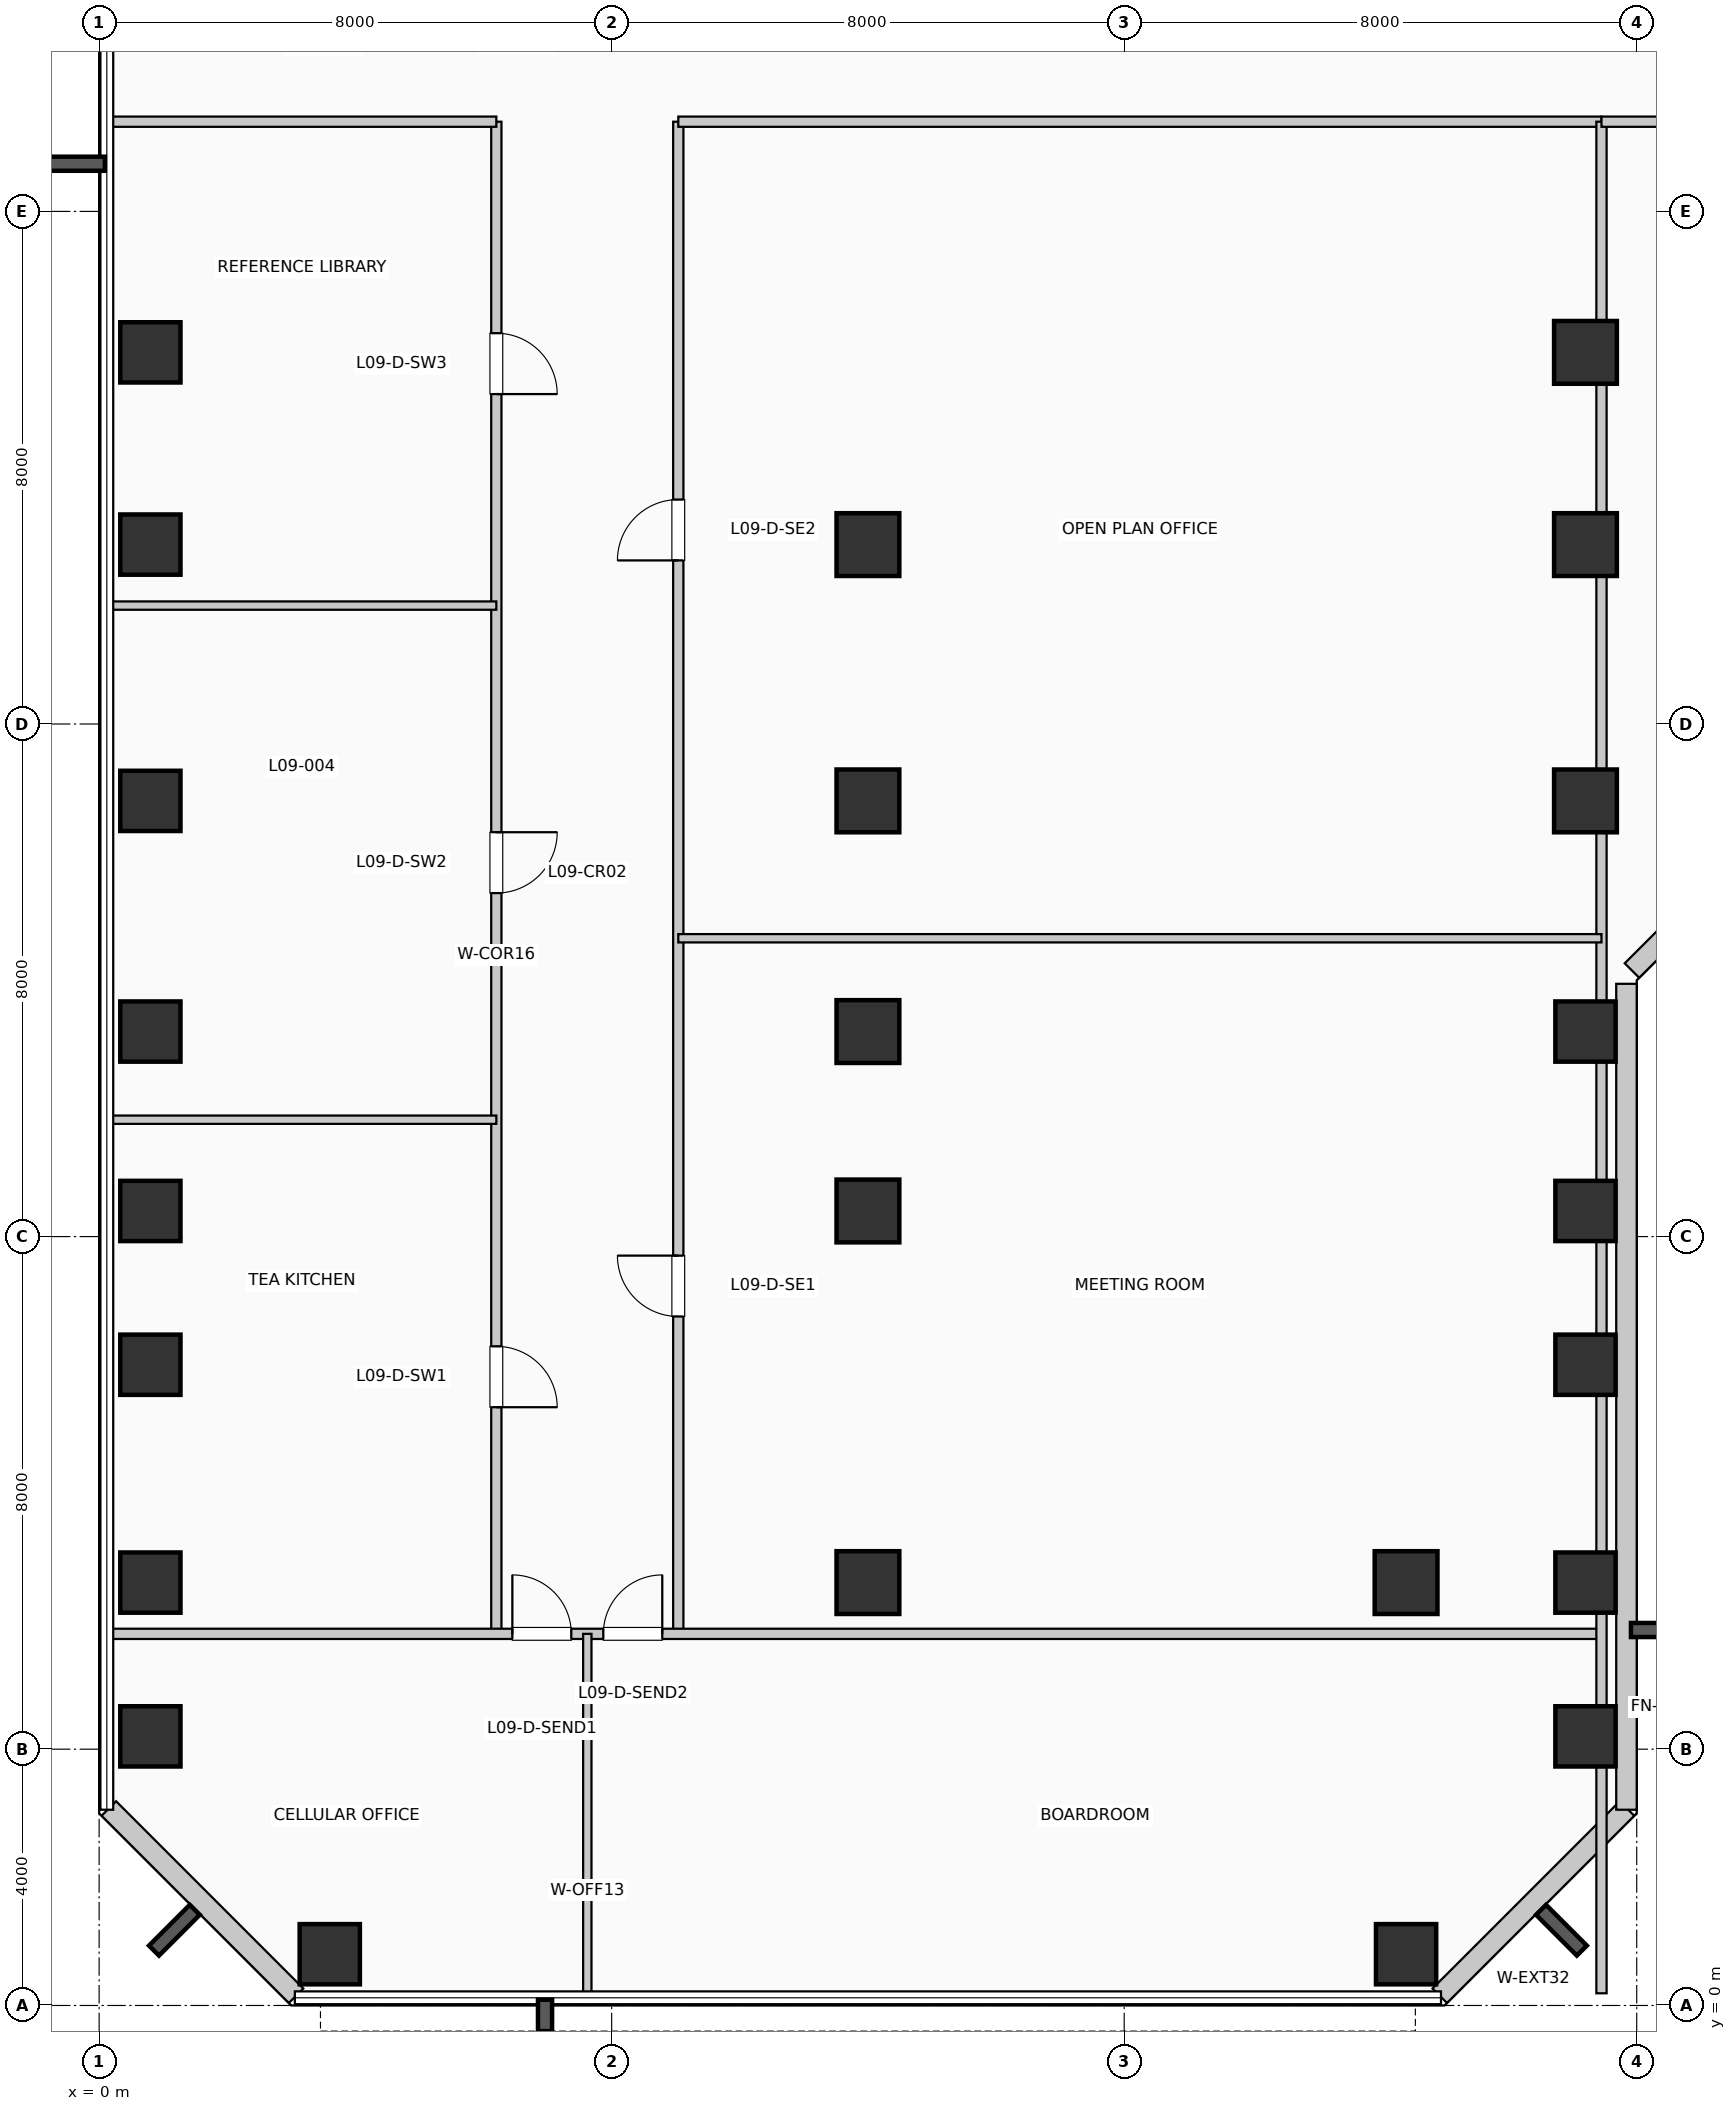
"""IFC4 building model, lengths in metres.
Left out: names, types, materials, properties, quantities, classifications, styles, units other than length and angle.
Written with IfcOpenShell. Run it as: python <this file> out.ifc"""

import sys

from ifc_helpers import new_model, si_unit, direction, frame, frame_2d, origin, origin_2d, place, context, subcontext, project, spatial, rectangle, extrude, element, fill, save


model = new_model("IFC4")
c1 = context("Model", 3, precision=1e-05, world=origin(), true_north=direction((0.0, 1.0)))
c2 = subcontext(c1, "Body", "Model", "MODEL_VIEW")
j1 = project(units=[si_unit("LENGTHUNIT", "METRE"), si_unit("PLANEANGLEUNIT", "RADIAN")], contexts=[c1])
p1 = place(None, origin())
s1 = spatial("IfcSite", under=j1, at=p1, CompositionType="ELEMENT")
p2 = place(p1, origin())
s2 = spatial("IfcBuilding", under=s1, at=p2, CompositionType="ELEMENT")
p3 = place(p2, frame((0.0, 0.0, 42.24)))
s3 = spatial("IfcBuildingStorey", under=s2, at=p3, CompositionType="ELEMENT", Elevation=42.24)
for number, where, z_axis, x_axis in (
    (1, (0.8, 4.2, 0.0), (0.0, 0.0, 1.0), (1.0, 0.0, 0.0)),
    (2, (0.8, 6.6, 0.0), (0.0, 0.0, 1.0), (1.0, 0.0, 0.0)),
    (3, (0.8, 10.0, 0.0), (0.0, 0.0, 1.0), (1.0, 0.0, 0.0)),
    (4, (0.8, 12.4, 0.0), (0.0, 0.0, 1.0), (1.0, 0.0, 0.0)),
    (5, (0.8, 15.2, 0.0), (0.0, 0.0, 1.0), (1.0, 0.0, 0.0)),
    (6, (0.8, 18.8, 0.0), (0.0, 0.0, 1.0), (1.0, 0.0, 0.0)),
    (7, (0.8, 22.8, 0.0), (0.0, 0.0, 1.0), (1.0, 0.0, 0.0)),
    (8, (0.8, 25.8, 0.0), (0.0, 0.0, 1.0), (1.0, 0.0, 0.0)),
    (9, (3.6, 0.8, 0.0), (0.0, 0.0, 1.0), (1.0, 0.0, 0.0)),
):
    element("IfcColumn", number, at=place(p3, frame(where, z_axis=z_axis, x_axis=x_axis)), inside=s3, PredefinedType="COLUMN", context=c2, shape_type="SweptSolid", body=[
        extrude(rectangle(XDim=0.94, YDim=0.94, at=origin_2d()), origin(), (0.0, 0.0, 1.0), 3.96),
    ])
for number, where, z_axis, x_axis in (
    (10, (12.0, 6.6, 0.0), (0.0, 0.0, 1.0), (1.0, 0.0, 0.0)),
    (11, (12.0, 12.4, 0.0), (0.0, 0.0, 1.0), (1.0, 0.0, 0.0)),
    (12, (12.0, 15.2, 0.0), (0.0, 0.0, 1.0), (1.0, 0.0, 0.0)),
    (13, (12.0, 18.8, 0.0), (0.0, 0.0, 1.0), (1.0, 0.0, 0.0)),
    (14, (12.0, 22.8, 0.0), (0.0, 0.0, 1.0), (1.0, 0.0, 0.0)),
):
    element("IfcColumn", number, at=place(p3, frame(where, z_axis=z_axis, x_axis=x_axis)), inside=s3, PredefinedType="COLUMN", context=c2, shape_type="SweptSolid", body=[
        extrude(rectangle(XDim=0.98, YDim=0.98, at=origin_2d()), origin(), (0.0, 0.0, 1.0), 3.96),
    ])
p4 = place(p3, frame((20.4, 0.8, 0.0), z_axis=(0.0, 0.0, 1.0), x_axis=(1.0, 0.0, 0.0)))
e15 = element("IfcColumn", 15, at=p4, inside=s3, PredefinedType="COLUMN", context=c2, shape_type="SweptSolid", body=[
    extrude(rectangle(XDim=0.94, YDim=0.94, at=origin_2d()), origin(), (0.0, 0.0, 1.0), 3.96),
])
p5 = place(p3, frame((20.4, 6.6, 0.0), z_axis=(0.0, 0.0, 1.0), x_axis=(1.0, 0.0, 0.0)))
e16 = element("IfcColumn", 16, at=p5, inside=s3, PredefinedType="COLUMN", context=c2, shape_type="SweptSolid", body=[
    extrude(rectangle(XDim=0.98, YDim=0.98, at=origin_2d()), origin(), (0.0, 0.0, 1.0), 3.96),
])
for number, where, z_axis, x_axis in (
    (17, (23.2, 4.2, 0.0), (0.0, 0.0, 1.0), (1.0, 0.0, 0.0)),
    (18, (23.2, 6.6, 0.0), (0.0, 0.0, 1.0), (1.0, 0.0, 0.0)),
    (19, (23.2, 10.0, 0.0), (0.0, 0.0, 1.0), (1.0, 0.0, 0.0)),
    (20, (23.2, 12.4, 0.0), (0.0, 0.0, 1.0), (1.0, 0.0, 0.0)),
    (21, (23.2, 15.2, 0.0), (0.0, 0.0, 1.0), (1.0, 0.0, 0.0)),
):
    element("IfcColumn", number, at=place(p3, frame(where, z_axis=z_axis, x_axis=x_axis)), inside=s3, PredefinedType="COLUMN", context=c2, shape_type="SweptSolid", body=[
        extrude(rectangle(XDim=0.94, YDim=0.94, at=origin_2d()), origin(), (0.0, 0.0, 1.0), 3.96),
    ])
for number, where, z_axis, x_axis in (
    (22, (23.2, 18.8, 0.0), (0.0, 0.0, 1.0), (1.0, 0.0, 0.0)),
    (23, (23.2, 22.8, 0.0), (0.0, 0.0, 1.0), (1.0, 0.0, 0.0)),
    (24, (23.2, 25.8, 0.0), (0.0, 0.0, 1.0), (1.0, 0.0, 0.0)),
):
    element("IfcColumn", number, at=place(p3, frame(where, z_axis=z_axis, x_axis=x_axis)), inside=s3, PredefinedType="COLUMN", context=c2, shape_type="SweptSolid", body=[
        extrude(rectangle(XDim=0.98, YDim=0.98, at=origin_2d()), origin(), (0.0, 0.0, 1.0), 3.96),
    ])
p6 = place(p3, frame((20.926, 0.152, 0.0), z_axis=(0.0, 0.0, 1.0), x_axis=(0.707106781187, 0.707106781187, 0.0)))
e25 = element("IfcWall", 25, at=p6, inside=s3, PredefinedType="SOLIDWALL", context=c2, shape_type="SweptSolid", body=[
    extrude(rectangle(XDim=4.133, YDim=0.32, at=frame_2d((2.066, 0.0))), origin(), (0.0, 0.0, 1.0), 3.71),
])
p7 = place(p3, frame((23.84, 3.055, 0.0), z_axis=(0.0, 0.0, 1.0), x_axis=(0.0, 1.0, 0.0)))
e26 = element("IfcWall", 26, at=p7, inside=s3, PredefinedType="SOLIDWALL", context=c2, shape_type="SweptSolid", body=[
    extrude(rectangle(XDim=12.89, YDim=0.32, at=frame_2d((6.445, 0.0))), origin(), (0.0, 0.0, 1.0), 3.71),
])
p8 = place(p3, frame((23.926, 16.152, 0.0), z_axis=(0.0, 0.0, 1.0), x_axis=(0.707106781187, 0.707106781187, 0.0)))
e27 = element("IfcWall", 27, at=p8, inside=s3, PredefinedType="SOLIDWALL", context=c2, shape_type="SweptSolid", body=[
    extrude(rectangle(XDim=2.718, YDim=0.32, at=frame_2d((1.359, 0.0))), origin(), (0.0, 0.0, 1.0), 3.71),
])
p9 = place(p3, frame((0.152, 3.074, 0.0), z_axis=(0.0, 0.0, 1.0), x_axis=(0.707106781187, -0.707106781187, 0.0)))
e28 = element("IfcWall", 28, at=p9, inside=s3, PredefinedType="SOLIDWALL", context=c2, shape_type="SweptSolid", body=[
    extrude(rectangle(XDim=4.133, YDim=0.32, at=frame_2d((2.066, 0.0))), origin(), (0.0, 0.0, 1.0), 3.71),
])
p10 = place(p3, frame((6.2, 5.8, 0.0), z_axis=(0.0, 0.0, 1.0), x_axis=(0.0, 1.0, 0.0)))
e29 = element("IfcWall", 29, at=p10, inside=s3, PredefinedType="PARTITIONING", context=c2, shape_type="SweptSolid", body=[
    extrude(rectangle(XDim=23.6, YDim=0.16, at=frame_2d((11.8, 0.0))), origin(), (0.0, 0.0, 1.0), 3.71),
])
p11 = place(p10, frame((4.487, 0.0, 0.0), z_axis=(0.0, 0.0, 1.0), x_axis=(-1.0, 0.0, 0.0)))
e30 = element("IfcOpeningElement", 30, at=p11, cuts=e29, PredefinedType="OPENING", context=c2, shape_type="SweptSolid", body=[
    extrude(rectangle(XDim=0.95, YDim=2.15, at=frame_2d((0.475, 1.075))), frame((0.0, 0.09, 0.0), z_axis=(0.0, -1.0, 0.0), x_axis=(1.0, 0.0, 0.0)), (0.0, 0.0, 1.0), 0.18),
])
p12 = place(p10, frame((12.511, 0.0, 0.0), z_axis=(0.0, 0.0, 1.0), x_axis=(-1.0, 0.0, 0.0)))
e31 = element("IfcOpeningElement", 31, at=p12, cuts=e29, PredefinedType="OPENING", context=c2, shape_type="SweptSolid", body=[
    extrude(rectangle(XDim=0.95, YDim=2.15, at=frame_2d((0.475, 1.075))), frame((0.0, 0.09, 0.0), z_axis=(0.0, -1.0, 0.0), x_axis=(1.0, 0.0, 0.0)), (0.0, 0.0, 1.0), 0.18),
])
p13 = place(p10, frame((20.299, 0.0, 0.0), z_axis=(0.0, 0.0, 1.0), x_axis=(-1.0, 0.0, 0.0)))
e32 = element("IfcOpeningElement", 32, at=p13, cuts=e29, PredefinedType="OPENING", context=c2, shape_type="SweptSolid", body=[
    extrude(rectangle(XDim=0.95, YDim=2.15, at=frame_2d((0.475, 1.075))), frame((0.0, 0.09, 0.0), z_axis=(0.0, -1.0, 0.0), x_axis=(1.0, 0.0, 0.0)), (0.0, 0.0, 1.0), 0.18),
])
p14 = place(p3, frame((9.04, 5.8, 0.0), z_axis=(0.0, 0.0, 1.0), x_axis=(0.0, 1.0, 0.0)))
e33 = element("IfcWall", 33, at=p14, inside=s3, PredefinedType="PARTITIONING", context=c2, shape_type="SweptSolid", body=[
    extrude(rectangle(XDim=23.6, YDim=0.16, at=frame_2d((11.8, 0.0))), origin(), (0.0, 0.0, 1.0), 3.71),
])
p15 = place(p14, frame((4.953, 0.0, 0.0)))
e34 = element("IfcOpeningElement", 34, at=p15, cuts=e33, PredefinedType="OPENING", context=c2, shape_type="SweptSolid", body=[
    extrude(rectangle(XDim=0.95, YDim=2.15, at=frame_2d((0.475, 1.075))), frame((0.0, 0.09, 0.0), z_axis=(0.0, -1.0, 0.0), x_axis=(1.0, 0.0, 0.0)), (0.0, 0.0, 1.0), 0.18),
])
p16 = place(p14, frame((16.753, 0.0, 0.0)))
e35 = element("IfcOpeningElement", 35, at=p16, cuts=e33, PredefinedType="OPENING", context=c2, shape_type="SweptSolid", body=[
    extrude(rectangle(XDim=0.95, YDim=2.15, at=frame_2d((0.475, 1.075))), frame((0.0, 0.09, 0.0), z_axis=(0.0, -1.0, 0.0), x_axis=(1.0, 0.0, 0.0)), (0.0, 0.0, 1.0), 0.18),
])
p17 = place(p3, frame((0.19, 5.8, 0.0), z_axis=(0.0, 0.0, 1.0), x_axis=(1.0, 0.0, 0.0)))
e36 = element("IfcWall", 36, at=p17, inside=s3, PredefinedType="PARTITIONING", context=c2, shape_type="SweptSolid", body=[
    extrude(rectangle(XDim=23.26, YDim=0.16, at=frame_2d((11.63, 0.0))), origin(), (0.0, 0.0, 1.0), 3.71),
])
p18 = place(p17, frame((6.26, 0.0, 0.0)))
e37 = element("IfcOpeningElement", 37, at=p18, cuts=e36, PredefinedType="OPENING", context=c2, shape_type="SweptSolid", body=[
    extrude(rectangle(XDim=0.92, YDim=2.1, at=frame_2d((0.46, 1.05))), frame((0.0, 0.09, 0.0), z_axis=(0.0, -1.0, 0.0), x_axis=(1.0, 0.0, 0.0)), (0.0, 0.0, 1.0), 0.18),
])
p19 = place(p17, frame((7.68, 0.0, 0.0)))
e38 = element("IfcOpeningElement", 38, at=p19, cuts=e36, PredefinedType="OPENING", context=c2, shape_type="SweptSolid", body=[
    extrude(rectangle(XDim=0.92, YDim=2.1, at=frame_2d((0.46, 1.05))), frame((0.0, 0.09, 0.0), z_axis=(0.0, -1.0, 0.0), x_axis=(1.0, 0.0, 0.0)), (0.0, 0.0, 1.0), 0.18),
])
p20 = place(p3, frame((0.19, 29.4, 0.0), z_axis=(0.0, 0.0, 1.0), x_axis=(1.0, 0.0, 0.0)))
e39 = element("IfcWall", 39, at=p20, inside=s3, PredefinedType="PARTITIONING", context=c2, shape_type="SweptSolid", body=[
    extrude(rectangle(XDim=6.01, YDim=0.16, at=frame_2d((3.005, 0.0))), origin(), (0.0, 0.0, 1.0), 3.365),
])
p21 = place(p3, frame((9.04, 29.4, 0.0), z_axis=(0.0, 0.0, 1.0), x_axis=(1.0, 0.0, 0.0)))
e40 = element("IfcWall", 40, at=p21, inside=s3, PredefinedType="PARTITIONING", context=c2, shape_type="SweptSolid", body=[
    extrude(rectangle(XDim=14.41, YDim=0.16, at=frame_2d((7.205, 0.0))), origin(), (0.0, 0.0, 1.0), 3.365),
])
p22 = place(p3, frame((23.45, 0.19, 0.0), z_axis=(0.0, 0.0, 1.0), x_axis=(0.0, 1.0, 0.0)))
e41 = element("IfcWall", 41, at=p22, inside=s3, PredefinedType="PARTITIONING", context=c2, shape_type="SweptSolid", body=[
    extrude(rectangle(XDim=29.21, YDim=0.16, at=frame_2d((14.605, 0.0))), origin(), (0.0, 0.0, 1.0), 2.995),
])
p23 = place(p3, frame((7.62, 0.19, 0.0), z_axis=(0.0, 0.0, 1.0), x_axis=(0.0, 1.0, 0.0)))
e42 = element("IfcWall", 42, at=p23, inside=s3, PredefinedType="PARTITIONING", context=c2, shape_type="SweptSolid", body=[
    extrude(rectangle(XDim=5.61, YDim=0.13, at=frame_2d((2.805, 0.0))), origin(), (0.0, 0.0, 1.0), 3.71),
])
for number, where, z_axis, x_axis in (
    (43, (0.19, 13.824, 0.0), (0.0, 0.0, 1.0), (1.0, 0.0, 0.0)),
    (44, (0.19, 21.848, 0.0), (0.0, 0.0, 1.0), (1.0, 0.0, 0.0)),
):
    element("IfcWall", number, at=place(p3, frame(where, z_axis=z_axis, x_axis=x_axis)), inside=s3, PredefinedType="PARTITIONING", context=c2, shape_type="SweptSolid", body=[
        extrude(rectangle(XDim=6.01, YDim=0.13, at=frame_2d((3.005, 0.0))), origin(), (0.0, 0.0, 1.0), 3.71),
    ])
p24 = place(p3, frame((9.04, 16.656, 0.0), z_axis=(0.0, 0.0, 1.0), x_axis=(1.0, 0.0, 0.0)))
e45 = element("IfcWall", 45, at=p24, inside=s3, PredefinedType="PARTITIONING", context=c2, shape_type="SweptSolid", body=[
    extrude(rectangle(XDim=14.41, YDim=0.13, at=frame_2d((7.205, 0.0))), origin(), (0.0, 0.0, 1.0), 3.71),
])
p25 = place(p3, frame((23.45, 29.4, 0.0), z_axis=(0.0, 0.0, 1.0), x_axis=(1.0, 0.0, 0.0)))
e46 = element("IfcWall", 46, at=p25, inside=s3, PredefinedType="PARTITIONING", context=c2, shape_type="SweptSolid", body=[
    extrude(rectangle(XDim=32.36, YDim=0.16, at=frame_2d((16.18, 0.0))), origin(), (0.0, 0.0, 1.0), 3.365),
])
p26 = place(p25, frame((8.565, 0.0, 0.0), z_axis=(0.0, 0.0, 1.0), x_axis=(-1.0, 0.0, 0.0)))
e47 = element("IfcOpeningElement", 47, at=p26, cuts=e46, PredefinedType="OPENING", context=c2, shape_type="SweptSolid", body=[
    extrude(rectangle(XDim=0.95, YDim=2.15, at=frame_2d((0.475, 1.075))), frame((0.0, 0.09, 0.0), z_axis=(0.0, -1.0, 0.0), x_axis=(1.0, 0.0, 0.0)), (0.0, 0.0, 1.0), 0.18),
])
p27 = place(p25, frame((24.745, 0.0, 0.0), z_axis=(0.0, 0.0, 1.0), x_axis=(-1.0, 0.0, 0.0)))
e48 = element("IfcOpeningElement", 48, at=p27, cuts=e46, PredefinedType="OPENING", context=c2, shape_type="SweptSolid", body=[
    extrude(rectangle(XDim=0.95, YDim=2.15, at=frame_2d((0.475, 1.075))), frame((0.0, 0.09, 0.0), z_axis=(0.0, -1.0, 0.0), x_axis=(1.0, 0.0, 0.0)), (0.0, 0.0, 1.0), 0.18),
])
p28 = place(p18, origin())
e49 = element("IfcDoor", 49, at=p28, inside=s3, OperationType="SINGLE_SWING_LEFT", PredefinedType="DOOR", context=c2, shape_type="SweptSolid", body=[
    extrude(rectangle(XDim=0.92, YDim=2.1, at=frame_2d((0.46, 1.05))), frame((0.0, 0.025, 0.0), z_axis=(0.0, -1.0, 0.0), x_axis=(1.0, 0.0, 0.0)), (0.0, 0.0, 1.0), 0.05),
])
fill(e37, e49)
p29 = place(p19, origin())
e50 = element("IfcDoor", 50, at=p29, inside=s3, OperationType="SINGLE_SWING_RIGHT", PredefinedType="DOOR", context=c2, shape_type="SweptSolid", body=[
    extrude(rectangle(XDim=0.92, YDim=2.1, at=frame_2d((0.46, 1.05))), frame((0.0, 0.025, 0.0), z_axis=(0.0, -1.0, 0.0), x_axis=(1.0, 0.0, 0.0)), (0.0, 0.0, 1.0), 0.05),
])
fill(e38, e50)
p30 = place(p11, origin())
e51 = element("IfcDoor", 51, at=p30, inside=s3, OperationType="SINGLE_SWING_LEFT", PredefinedType="DOOR", context=c2, shape_type="SweptSolid", body=[
    extrude(rectangle(XDim=0.95, YDim=2.15, at=frame_2d((0.475, 1.075))), frame((0.0, 0.025, 0.0), z_axis=(0.0, -1.0, 0.0), x_axis=(1.0, 0.0, 0.0)), (0.0, 0.0, 1.0), 0.05),
])
fill(e30, e51)
p31 = place(p12, origin())
e52 = element("IfcDoor", 52, at=p31, inside=s3, OperationType="SINGLE_SWING_RIGHT", PredefinedType="DOOR", context=c2, shape_type="SweptSolid", body=[
    extrude(rectangle(XDim=0.95, YDim=2.15, at=frame_2d((0.475, 1.075))), frame((0.0, 0.025, 0.0), z_axis=(0.0, -1.0, 0.0), x_axis=(1.0, 0.0, 0.0)), (0.0, 0.0, 1.0), 0.05),
])
fill(e31, e52)
p32 = place(p13, origin())
e53 = element("IfcDoor", 53, at=p32, inside=s3, OperationType="SINGLE_SWING_LEFT", PredefinedType="DOOR", context=c2, shape_type="SweptSolid", body=[
    extrude(rectangle(XDim=0.95, YDim=2.15, at=frame_2d((0.475, 1.075))), frame((0.0, 0.025, 0.0), z_axis=(0.0, -1.0, 0.0), x_axis=(1.0, 0.0, 0.0)), (0.0, 0.0, 1.0), 0.05),
])
fill(e32, e53)
p33 = place(p15, origin())
e54 = element("IfcDoor", 54, at=p33, inside=s3, OperationType="SINGLE_SWING_RIGHT", PredefinedType="DOOR", context=c2, shape_type="SweptSolid", body=[
    extrude(rectangle(XDim=0.95, YDim=2.15, at=frame_2d((0.475, 1.075))), frame((0.0, 0.025, 0.0), z_axis=(0.0, -1.0, 0.0), x_axis=(1.0, 0.0, 0.0)), (0.0, 0.0, 1.0), 0.05),
])
fill(e34, e54)
p34 = place(p16, origin())
e55 = element("IfcDoor", 55, at=p34, inside=s3, OperationType="SINGLE_SWING_LEFT", PredefinedType="DOOR", context=c2, shape_type="SweptSolid", body=[
    extrude(rectangle(XDim=0.95, YDim=2.15, at=frame_2d((0.475, 1.075))), frame((0.0, 0.025, 0.0), z_axis=(0.0, -1.0, 0.0), x_axis=(1.0, 0.0, 0.0)), (0.0, 0.0, 1.0), 0.05),
])
fill(e35, e55)
save(model, sys.argv[1])
